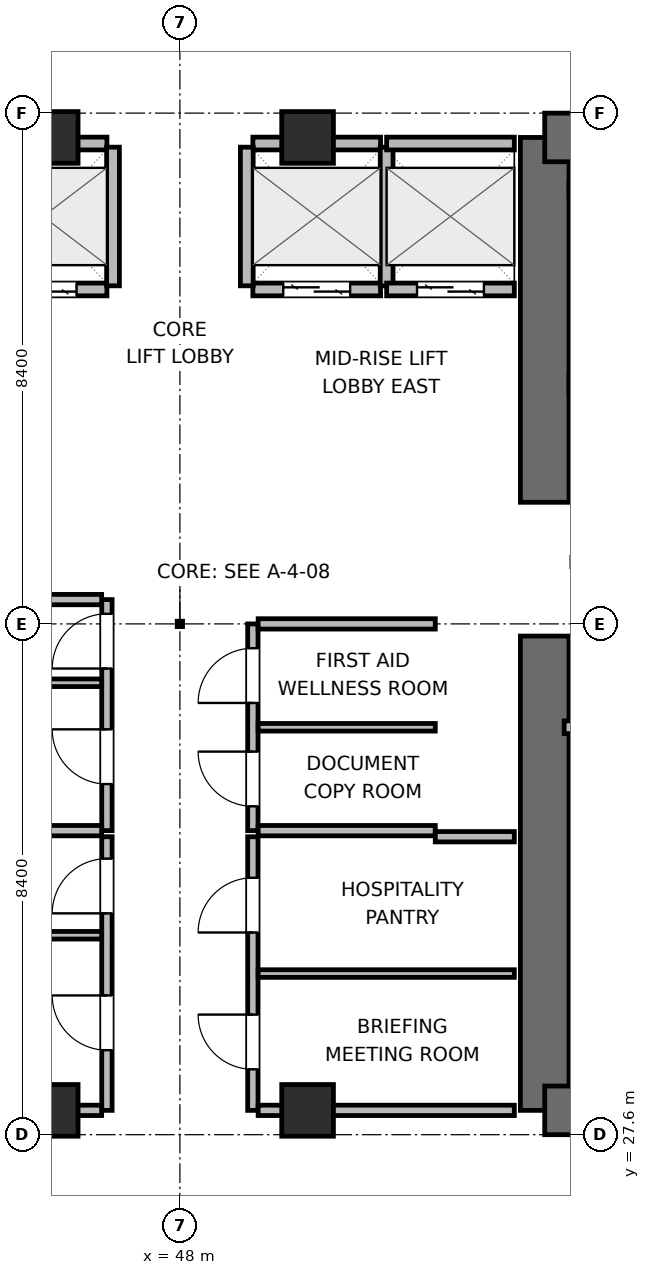
"""IFC4 building model, lengths in metres.
Left out: names, types, materials, properties, quantities, classifications, styles, units other than length and angle.
Written with IfcOpenShell. Run it as: python <this file> out.ifc"""

import sys

from ifc_helpers import new_model, si_unit, direction, frame, frame_2d, origin, origin_2d, place, context, subcontext, project, spatial, rectangle, extrude, element, fill, save


model = new_model("IFC4")
c1 = context("Model", 3, precision=1e-05, world=origin(), true_north=direction((0.0, 1.0)))
c2 = subcontext(c1, "Body", "Model", "MODEL_VIEW")
j1 = project(units=[si_unit("LENGTHUNIT", "METRE"), si_unit("PLANEANGLEUNIT", "RADIAN")], contexts=[c1])
p1 = place(None, origin())
s1 = spatial("IfcSite", under=j1, at=p1, CompositionType="ELEMENT")
p2 = place(p1, origin())
s2 = spatial("IfcBuilding", under=s1, at=p2, CompositionType="ELEMENT")
p3 = place(p2, frame((0.0, 0.0, 174.0)))
s3 = spatial("IfcBuildingStorey", under=s2, at=p3, CompositionType="ELEMENT", Elevation=174.0)
p4 = place(p3, frame((54.0, 28.0, 0.0), z_axis=(0.0, 0.0, 1.0), x_axis=(0.0, 1.0, 0.0)))
e1 = element("IfcWall", 1, at=p4, inside=s3, PredefinedType="SHEAR", context=c2, shape_type="SweptSolid", body=[
    extrude(rectangle(XDim=7.8, YDim=0.8, at=frame_2d((3.9, 0.0))), origin(), (0.0, 0.0, 1.0), 3.9),
])
p5 = place(p3, frame((54.0, 38.0, 0.0), z_axis=(0.0, 0.0, 1.0), x_axis=(0.0, 1.0, 0.0)))
e2 = element("IfcWall", 2, at=p5, inside=s3, PredefinedType="SHEAR", context=c2, shape_type="SweptSolid", body=[
    extrude(rectangle(XDim=6.0, YDim=0.8, at=frame_2d((3.0, 0.0))), origin(), (0.0, 0.0, 1.0), 3.9),
])
p6 = place(p3, frame((54.0, 28.0, 0.0), z_axis=(0.0, 0.0, 1.0), x_axis=(1.0, 0.0, 0.0)))
e3 = element("IfcWall", 3, at=p6, inside=s3, PredefinedType="SHEAR", context=c2, shape_type="SweptSolid", body=[
    extrude(rectangle(XDim=9.2, YDim=0.8, at=frame_2d((4.6, 0.0))), origin(), (0.0, 0.0, 1.0), 3.9),
])
p7 = place(p6, frame((3.975, 0.0, 0.0)))
e4 = element("IfcOpeningElement", 4, at=p7, cuts=e3, PredefinedType="OPENING", context=c2, shape_type="SweptSolid", body=[
    extrude(rectangle(XDim=1.05, YDim=2.04, at=frame_2d((0.525, 1.02))), frame((0.0, 0.41, 0.0), z_axis=(0.0, -1.0, 0.0), x_axis=(1.0, 0.0, 0.0)), (0.0, 0.0, 1.0), 0.82),
])
p8 = place(p3, frame((54.0, 44.0, 0.0), z_axis=(0.0, 0.0, 1.0), x_axis=(1.0, 0.0, 0.0)))
e5 = element("IfcWall", 5, at=p8, inside=s3, PredefinedType="SHEAR", context=c2, shape_type="SweptSolid", body=[
    extrude(rectangle(XDim=9.2, YDim=0.8, at=frame_2d((4.6, 0.0))), origin(), (0.0, 0.0, 1.0), 3.9),
])
p9 = place(p3, frame((54.4, 39.95, 0.0), z_axis=(0.0, 0.0, 1.0), x_axis=(1.0, 0.0, 0.0)))
e6 = element("IfcWall", 6, at=p9, inside=s3, PredefinedType="SHEAR", context=c2, shape_type="SweptSolid", body=[
    extrude(rectangle(XDim=8.4, YDim=0.26, at=frame_2d((4.2, 0.0))), origin(), (0.0, 0.0, 1.0), 3.9),
])
p10 = place(p9, frame((0.8, 0.0, 0.0)))
e7 = element("IfcOpeningElement", 7, at=p10, cuts=e6, PredefinedType="OPENING", context=c2, shape_type="SweptSolid", body=[
    extrude(rectangle(XDim=1.0, YDim=2.04, at=frame_2d((0.5, 1.02))), frame((0.0, 0.14, 0.0), z_axis=(0.0, -1.0, 0.0), x_axis=(1.0, 0.0, 0.0)), (0.0, 0.0, 1.0), 0.28),
])
p11 = place(p3, frame((54.4, 43.15, 0.0), z_axis=(0.0, 0.0, 1.0), x_axis=(1.0, 0.0, 0.0)))
e8 = element("IfcWall", 8, at=p11, inside=s3, PredefinedType="SHEAR", context=c2, shape_type="SweptSolid", body=[
    extrude(rectangle(XDim=8.4, YDim=0.26, at=frame_2d((4.2, 0.0))), origin(), (0.0, 0.0, 1.0), 3.9),
])
for number, where, z_axis, x_axis in (
    (9, (45.9, 28.0, 0.0), (0.0, 0.0, 1.0), (1.0, 0.0, 0.0)),
    (10, (50.1, 28.0, 0.0), (0.0, 0.0, 1.0), (1.0, 0.0, 0.0)),
    (11, (45.9, 44.0, 0.0), (0.0, 0.0, 1.0), (1.0, 0.0, 0.0)),
    (12, (50.1, 44.0, 0.0), (0.0, 0.0, 1.0), (1.0, 0.0, 0.0)),
):
    element("IfcColumn", number, at=place(p3, frame(where, z_axis=z_axis, x_axis=x_axis)), inside=s3, PredefinedType="COLUMN", context=c2, shape_type="SweptSolid", body=[
        extrude(rectangle(XDim=0.85, YDim=0.85, at=origin_2d()), origin(), (0.0, 0.0, 1.0), 3.9),
    ])
p12 = place(p3, frame((54.32, 34.3, 0.0), z_axis=(0.0, 0.0, 1.0), x_axis=(1.0, 0.0, 0.0)))
e13 = element("IfcWall", 13, at=p12, inside=s3, PredefinedType="PARTITIONING", context=c2, shape_type="SweptSolid", body=[
    extrude(rectangle(XDim=3.48, YDim=0.21, at=frame_2d((1.74, 0.0))), origin(), (0.0, 0.0, 1.0), 3.68),
])
p13 = place(p3, frame((44.7, 41.5, 0.0), z_axis=(0.0, 0.0, 1.0), x_axis=(1.0, 0.0, 0.0)))
e14 = element("IfcWall", 14, at=p13, inside=s3, PredefinedType="PARTITIONING", context=c2, shape_type="SweptSolid", body=[
    extrude(rectangle(XDim=2.1, YDim=0.21, at=frame_2d((1.05, 0.0))), origin(), (0.0, 0.0, 1.0), 3.68),
])
p14 = place(p13, frame((0.5, 0.0, 0.0)))
e15 = element("IfcOpeningElement", 15, at=p14, cuts=e14, PredefinedType="OPENING", context=c2, shape_type="SweptSolid", body=[
    extrude(rectangle(XDim=1.1, YDim=2.04, at=frame_2d((0.55, 1.02))), frame((0.0, 0.115, 0.0), z_axis=(0.0, -1.0, 0.0), x_axis=(1.0, 0.0, 0.0)), (0.0, 0.0, 1.0), 0.23),
])
p15 = place(p3, frame((44.7, 43.9, 0.0), z_axis=(0.0, 0.0, 1.0), x_axis=(1.0, 0.0, 0.0)))
e16 = element("IfcWall", 16, at=p15, inside=s3, PredefinedType="PARTITIONING", context=c2, shape_type="SweptSolid", body=[
    extrude(rectangle(XDim=2.1, YDim=0.21, at=frame_2d((1.05, 0.0))), origin(), (0.0, 0.0, 1.0), 2.765),
])
p16 = place(p3, frame((46.9, 41.56, 0.0), z_axis=(0.0, 0.0, 1.0), x_axis=(0.0, 1.0, 0.0)))
e17 = element("IfcWall", 17, at=p16, inside=s3, PredefinedType="PARTITIONING", context=c2, shape_type="SweptSolid", body=[
    extrude(rectangle(XDim=2.28, YDim=0.21, at=frame_2d((1.14, 0.0))), origin(), (0.0, 0.0, 1.0), 3.68),
])
p17 = place(p3, frame((49.2, 41.5, 0.0), z_axis=(0.0, 0.0, 1.0), x_axis=(1.0, 0.0, 0.0)))
e18 = element("IfcWall", 18, at=p17, inside=s3, PredefinedType="PARTITIONING", context=c2, shape_type="SweptSolid", body=[
    extrude(rectangle(XDim=2.1, YDim=0.21, at=frame_2d((1.05, 0.0))), origin(), (0.0, 0.0, 1.0), 3.68),
])
p18 = place(p17, frame((0.5, 0.0, 0.0)))
e19 = element("IfcOpeningElement", 19, at=p18, cuts=e18, PredefinedType="OPENING", context=c2, shape_type="SweptSolid", body=[
    extrude(rectangle(XDim=1.1, YDim=2.04, at=frame_2d((0.55, 1.02))), frame((0.0, 0.115, 0.0), z_axis=(0.0, -1.0, 0.0), x_axis=(1.0, 0.0, 0.0)), (0.0, 0.0, 1.0), 0.23),
])
p19 = place(p3, frame((49.2, 43.9, 0.0), z_axis=(0.0, 0.0, 1.0), x_axis=(1.0, 0.0, 0.0)))
e20 = element("IfcWall", 20, at=p19, inside=s3, PredefinedType="PARTITIONING", context=c2, shape_type="SweptSolid", body=[
    extrude(rectangle(XDim=2.1, YDim=0.21, at=frame_2d((1.05, 0.0))), origin(), (0.0, 0.0, 1.0), 2.765),
])
for number, where, z_axis, x_axis in (
    (21, (49.1, 41.56, 0.0), (0.0, 0.0, 1.0), (0.0, 1.0, 0.0)),
    (22, (51.4, 41.56, 0.0), (0.0, 0.0, 1.0), (0.0, 1.0, 0.0)),
):
    element("IfcWall", number, at=place(p3, frame(where, z_axis=z_axis, x_axis=x_axis)), inside=s3, PredefinedType="PARTITIONING", context=c2, shape_type="SweptSolid", body=[
        extrude(rectangle(XDim=2.28, YDim=0.21, at=frame_2d((1.14, 0.0))), origin(), (0.0, 0.0, 1.0), 3.68),
    ])
p20 = place(p3, frame((51.4, 41.5, 0.0), z_axis=(0.0, 0.0, 1.0), x_axis=(1.0, 0.0, 0.0)))
e23 = element("IfcWall", 23, at=p20, inside=s3, PredefinedType="PARTITIONING", context=c2, shape_type="SweptSolid", body=[
    extrude(rectangle(XDim=2.1, YDim=0.21, at=frame_2d((1.05, 0.0))), origin(), (0.0, 0.0, 1.0), 3.68),
])
p21 = place(p20, frame((0.5, 0.0, 0.0)))
e24 = element("IfcOpeningElement", 24, at=p21, cuts=e23, PredefinedType="OPENING", context=c2, shape_type="SweptSolid", body=[
    extrude(rectangle(XDim=1.1, YDim=2.04, at=frame_2d((0.55, 1.02))), frame((0.0, 0.115, 0.0), z_axis=(0.0, -1.0, 0.0), x_axis=(1.0, 0.0, 0.0)), (0.0, 0.0, 1.0), 0.23),
])
p22 = place(p3, frame((51.4, 43.9, 0.0), z_axis=(0.0, 0.0, 1.0), x_axis=(1.0, 0.0, 0.0)))
e25 = element("IfcWall", 25, at=p22, inside=s3, PredefinedType="PARTITIONING", context=c2, shape_type="SweptSolid", body=[
    extrude(rectangle(XDim=2.1, YDim=0.21, at=frame_2d((1.05, 0.0))), origin(), (0.0, 0.0, 1.0), 2.765),
])
p23 = place(p3, frame((46.8, 32.6, 0.0), z_axis=(0.0, 0.0, 1.0), x_axis=(0.0, 1.0, 0.0)))
e26 = element("IfcWall", 26, at=p23, inside=s3, PredefinedType="PARTITIONING", context=c2, shape_type="SweptSolid", body=[
    extrude(rectangle(XDim=3.8, YDim=0.17, at=frame_2d((1.9, 0.0))), origin(), (0.0, 0.0, 1.0), 3.68),
])
p24 = place(p23, frame((0.766, 0.0, 0.0)))
e27 = element("IfcOpeningElement", 27, at=p24, cuts=e26, PredefinedType="OPENING", context=c2, shape_type="SweptSolid", body=[
    extrude(rectangle(XDim=0.9, YDim=2.02, at=frame_2d((0.45, 1.01))), frame((0.0, 0.095, 0.0), z_axis=(0.0, -1.0, 0.0), x_axis=(1.0, 0.0, 0.0)), (0.0, 0.0, 1.0), 0.19),
])
p25 = place(p23, frame((2.666, 0.0, 0.0)))
e28 = element("IfcOpeningElement", 28, at=p25, cuts=e26, PredefinedType="OPENING", context=c2, shape_type="SweptSolid", body=[
    extrude(rectangle(XDim=0.9, YDim=2.02, at=frame_2d((0.45, 1.01))), frame((0.0, 0.095, 0.0), z_axis=(0.0, -1.0, 0.0), x_axis=(1.0, 0.0, 0.0)), (0.0, 0.0, 1.0), 0.19),
])
for number, where, z_axis, x_axis in (
    (29, (43.8, 32.6, 0.0), (0.0, 0.0, 1.0), (1.0, 0.0, 0.0)),
    (30, (43.8, 36.4, 0.0), (0.0, 0.0, 1.0), (1.0, 0.0, 0.0)),
):
    element("IfcWall", number, at=place(p3, frame(where, z_axis=z_axis, x_axis=x_axis)), inside=s3, PredefinedType="PARTITIONING", context=c2, shape_type="SweptSolid", body=[
        extrude(rectangle(XDim=2.913, YDim=0.17, at=frame_2d((1.457, 0.0))), origin(), (0.0, 0.0, 1.0), 3.68),
    ])
p26 = place(p3, frame((43.8, 35.032, 0.0), z_axis=(0.0, 0.0, 1.0), x_axis=(1.0, 0.0, 0.0)))
e31 = element("IfcWall", 31, at=p26, inside=s3, PredefinedType="PARTITIONING", context=c2, shape_type="SweptSolid", body=[
    extrude(rectangle(XDim=2.913, YDim=0.125, at=frame_2d((1.457, 0.0))), origin(), (0.0, 0.0, 1.0), 3.68),
])
p27 = place(p3, frame((49.2, 32.6, 0.0), z_axis=(0.0, 0.0, 1.0), x_axis=(0.0, 1.0, 0.0)))
e32 = element("IfcWall", 32, at=p27, inside=s3, PredefinedType="PARTITIONING", context=c2, shape_type="SweptSolid", body=[
    extrude(rectangle(XDim=3.4, YDim=0.17, at=frame_2d((1.7, 0.0))), origin(), (0.0, 0.0, 1.0), 3.68),
])
p28 = place(p27, frame((0.4, 0.0, 0.0)))
e33 = element("IfcOpeningElement", 33, at=p28, cuts=e32, PredefinedType="OPENING", context=c2, shape_type="SweptSolid", body=[
    extrude(rectangle(XDim=0.9, YDim=2.02, at=frame_2d((0.45, 1.01))), frame((0.0, 0.095, 0.0), z_axis=(0.0, -1.0, 0.0), x_axis=(1.0, 0.0, 0.0)), (0.0, 0.0, 1.0), 0.19),
])
p29 = place(p27, frame((2.1, 0.0, 0.0)))
e34 = element("IfcOpeningElement", 34, at=p29, cuts=e32, PredefinedType="OPENING", context=c2, shape_type="SweptSolid", body=[
    extrude(rectangle(XDim=0.9, YDim=2.02, at=frame_2d((0.45, 1.01))), frame((0.0, 0.095, 0.0), z_axis=(0.0, -1.0, 0.0), x_axis=(1.0, 0.0, 0.0)), (0.0, 0.0, 1.0), 0.19),
])
for number, where, z_axis, x_axis in (
    (35, (49.287, 32.6, 0.0), (0.0, 0.0, 1.0), (1.0, 0.0, 0.0)),
    (36, (49.287, 36.0, 0.0), (0.0, 0.0, 1.0), (1.0, 0.0, 0.0)),
):
    element("IfcWall", number, at=place(p3, frame(where, z_axis=z_axis, x_axis=x_axis)), inside=s3, PredefinedType="PARTITIONING", context=c2, shape_type="SweptSolid", body=[
        extrude(rectangle(XDim=2.913, YDim=0.17, at=frame_2d((1.457, 0.0))), origin(), (0.0, 0.0, 1.0), 3.68),
    ])
p30 = place(p3, frame((49.287, 34.3, 0.0), z_axis=(0.0, 0.0, 1.0), x_axis=(1.0, 0.0, 0.0)))
e37 = element("IfcWall", 37, at=p30, inside=s3, PredefinedType="PARTITIONING", context=c2, shape_type="SweptSolid", body=[
    extrude(rectangle(XDim=2.913, YDim=0.125, at=frame_2d((1.457, 0.0))), origin(), (0.0, 0.0, 1.0), 3.68),
])
p31 = place(p3, frame((46.8, 28.0, 0.0), z_axis=(0.0, 0.0, 1.0), x_axis=(0.0, 1.0, 0.0)))
e38 = element("IfcWall", 38, at=p31, inside=s3, PredefinedType="PARTITIONING", context=c2, shape_type="SweptSolid", body=[
    extrude(rectangle(XDim=4.5, YDim=0.17, at=frame_2d((2.25, 0.0))), origin(), (0.0, 0.0, 1.0), 3.68),
])
p32 = place(p31, frame((0.99, 0.0, 0.0)))
e39 = element("IfcOpeningElement", 39, at=p32, cuts=e38, PredefinedType="OPENING", context=c2, shape_type="SweptSolid", body=[
    extrude(rectangle(XDim=0.9, YDim=2.02, at=frame_2d((0.45, 1.01))), frame((0.0, 0.095, 0.0), z_axis=(0.0, -1.0, 0.0), x_axis=(1.0, 0.0, 0.0)), (0.0, 0.0, 1.0), 0.19),
])
p33 = place(p31, frame((3.24, 0.0, 0.0)))
e40 = element("IfcOpeningElement", 40, at=p33, cuts=e38, PredefinedType="OPENING", context=c2, shape_type="SweptSolid", body=[
    extrude(rectangle(XDim=0.9, YDim=2.02, at=frame_2d((0.45, 1.01))), frame((0.0, 0.095, 0.0), z_axis=(0.0, -1.0, 0.0), x_axis=(1.0, 0.0, 0.0)), (0.0, 0.0, 1.0), 0.19),
])
p34 = place(p3, frame((42.5, 28.0, 0.0), z_axis=(0.0, 0.0, 1.0), x_axis=(1.0, 0.0, 0.0)))
e41 = element("IfcWall", 41, at=p34, inside=s3, PredefinedType="PARTITIONING", context=c2, shape_type="SweptSolid", body=[
    extrude(rectangle(XDim=4.213, YDim=0.17, at=frame_2d((2.106, 0.0))), origin(), (0.0, 0.0, 1.0), 2.765),
])
p35 = place(p3, frame((42.5, 30.88, 0.0), z_axis=(0.0, 0.0, 1.0), x_axis=(1.0, 0.0, 0.0)))
e42 = element("IfcWall", 42, at=p35, inside=s3, PredefinedType="PARTITIONING", context=c2, shape_type="SweptSolid", body=[
    extrude(rectangle(XDim=4.213, YDim=0.125, at=frame_2d((2.106, 0.0))), origin(), (0.0, 0.0, 1.0), 3.68),
])
p36 = place(p3, frame((49.2, 28.0, 0.0), z_axis=(0.0, 0.0, 1.0), x_axis=(0.0, 1.0, 0.0)))
e43 = element("IfcWall", 43, at=p36, inside=s3, PredefinedType="PARTITIONING", context=c2, shape_type="SweptSolid", body=[
    extrude(rectangle(XDim=4.5, YDim=0.17, at=frame_2d((2.25, 0.0))), origin(), (0.0, 0.0, 1.0), 3.68),
])
p37 = place(p36, frame((0.675, 0.0, 0.0)))
e44 = element("IfcOpeningElement", 44, at=p37, cuts=e43, PredefinedType="OPENING", context=c2, shape_type="SweptSolid", body=[
    extrude(rectangle(XDim=0.9, YDim=2.02, at=frame_2d((0.45, 1.01))), frame((0.0, 0.095, 0.0), z_axis=(0.0, -1.0, 0.0), x_axis=(1.0, 0.0, 0.0)), (0.0, 0.0, 1.0), 0.19),
])
p38 = place(p36, frame((2.925, 0.0, 0.0)))
e45 = element("IfcOpeningElement", 45, at=p38, cuts=e43, PredefinedType="OPENING", context=c2, shape_type="SweptSolid", body=[
    extrude(rectangle(XDim=0.9, YDim=2.02, at=frame_2d((0.45, 1.01))), frame((0.0, 0.095, 0.0), z_axis=(0.0, -1.0, 0.0), x_axis=(1.0, 0.0, 0.0)), (0.0, 0.0, 1.0), 0.19),
])
p39 = place(p3, frame((49.287, 28.0, 0.0), z_axis=(0.0, 0.0, 1.0), x_axis=(1.0, 0.0, 0.0)))
e46 = element("IfcWall", 46, at=p39, inside=s3, PredefinedType="PARTITIONING", context=c2, shape_type="SweptSolid", body=[
    extrude(rectangle(XDim=4.213, YDim=0.17, at=frame_2d((2.106, 0.0))), origin(), (0.0, 0.0, 1.0), 2.765),
])
p40 = place(p3, frame((52.2, 32.5, 0.0), z_axis=(0.0, 0.0, 1.0), x_axis=(1.0, 0.0, 0.0)))
e47 = element("IfcWall", 47, at=p40, inside=s3, PredefinedType="PARTITIONING", context=c2, shape_type="SweptSolid", body=[
    extrude(rectangle(XDim=1.3, YDim=0.17, at=frame_2d((0.65, 0.0))), origin(), (0.0, 0.0, 1.0), 3.68),
])
p41 = place(p3, frame((49.287, 30.25, 0.0), z_axis=(0.0, 0.0, 1.0), x_axis=(1.0, 0.0, 0.0)))
e48 = element("IfcWall", 48, at=p41, inside=s3, PredefinedType="PARTITIONING", context=c2, shape_type="SweptSolid", body=[
    extrude(rectangle(XDim=4.213, YDim=0.125, at=frame_2d((2.106, 0.0))), origin(), (0.0, 0.0, 1.0), 3.68),
])
p42 = place(p14, origin())
e49 = element("IfcDoor", 49, at=p42, inside=s3, OperationType="DOUBLE_DOOR_SLIDING", PredefinedType="DOOR", context=c2, shape_type="SweptSolid", body=[
    extrude(rectangle(XDim=1.1, YDim=2.04, at=frame_2d((0.55, 1.02))), frame((0.0, 0.025, 0.0), z_axis=(0.0, -1.0, 0.0), x_axis=(1.0, 0.0, 0.0)), (0.0, 0.0, 1.0), 0.05),
])
fill(e15, e49)
p43 = place(p18, origin())
e50 = element("IfcDoor", 50, at=p43, inside=s3, OperationType="DOUBLE_DOOR_SLIDING", PredefinedType="DOOR", context=c2, shape_type="SweptSolid", body=[
    extrude(rectangle(XDim=1.1, YDim=2.04, at=frame_2d((0.55, 1.02))), frame((0.0, 0.025, 0.0), z_axis=(0.0, -1.0, 0.0), x_axis=(1.0, 0.0, 0.0)), (0.0, 0.0, 1.0), 0.05),
])
fill(e19, e50)
p44 = place(p21, origin())
e51 = element("IfcDoor", 51, at=p44, inside=s3, OperationType="DOUBLE_DOOR_SLIDING", PredefinedType="DOOR", context=c2, shape_type="SweptSolid", body=[
    extrude(rectangle(XDim=1.1, YDim=2.04, at=frame_2d((0.55, 1.02))), frame((0.0, 0.025, 0.0), z_axis=(0.0, -1.0, 0.0), x_axis=(1.0, 0.0, 0.0)), (0.0, 0.0, 1.0), 0.05),
])
fill(e24, e51)
p45 = place(p24, origin())
e52 = element("IfcDoor", 52, at=p45, inside=s3, OperationType="SINGLE_SWING_RIGHT", PredefinedType="DOOR", context=c2, shape_type="SweptSolid", body=[
    extrude(rectangle(XDim=0.9, YDim=2.02, at=frame_2d((0.45, 1.01))), frame((0.0, 0.025, 0.0), z_axis=(0.0, -1.0, 0.0), x_axis=(1.0, 0.0, 0.0)), (0.0, 0.0, 1.0), 0.05),
])
fill(e27, e52)
p46 = place(p25, origin())
e53 = element("IfcDoor", 53, at=p46, inside=s3, OperationType="SINGLE_SWING_LEFT", PredefinedType="DOOR", context=c2, shape_type="SweptSolid", body=[
    extrude(rectangle(XDim=0.9, YDim=2.02, at=frame_2d((0.45, 1.01))), frame((0.0, 0.025, 0.0), z_axis=(0.0, -1.0, 0.0), x_axis=(1.0, 0.0, 0.0)), (0.0, 0.0, 1.0), 0.05),
])
fill(e28, e53)
p47 = place(p28, origin())
e54 = element("IfcDoor", 54, at=p47, inside=s3, OperationType="SINGLE_SWING_RIGHT", PredefinedType="DOOR", context=c2, shape_type="SweptSolid", body=[
    extrude(rectangle(XDim=0.9, YDim=2.02, at=frame_2d((0.45, 1.01))), frame((0.0, 0.025, 0.0), z_axis=(0.0, -1.0, 0.0), x_axis=(1.0, 0.0, 0.0)), (0.0, 0.0, 1.0), 0.05),
])
fill(e33, e54)
p48 = place(p29, origin())
e55 = element("IfcDoor", 55, at=p48, inside=s3, OperationType="SINGLE_SWING_LEFT", PredefinedType="DOOR", context=c2, shape_type="SweptSolid", body=[
    extrude(rectangle(XDim=0.9, YDim=2.02, at=frame_2d((0.45, 1.01))), frame((0.0, 0.025, 0.0), z_axis=(0.0, -1.0, 0.0), x_axis=(1.0, 0.0, 0.0)), (0.0, 0.0, 1.0), 0.05),
])
fill(e34, e55)
p49 = place(p32, origin())
e56 = element("IfcDoor", 56, at=p49, inside=s3, OperationType="SINGLE_SWING_RIGHT", PredefinedType="DOOR", context=c2, shape_type="SweptSolid", body=[
    extrude(rectangle(XDim=0.9, YDim=2.02, at=frame_2d((0.45, 1.01))), frame((0.0, 0.025, 0.0), z_axis=(0.0, -1.0, 0.0), x_axis=(1.0, 0.0, 0.0)), (0.0, 0.0, 1.0), 0.05),
])
fill(e39, e56)
p50 = place(p33, origin())
e57 = element("IfcDoor", 57, at=p50, inside=s3, OperationType="SINGLE_SWING_LEFT", PredefinedType="DOOR", context=c2, shape_type="SweptSolid", body=[
    extrude(rectangle(XDim=0.9, YDim=2.02, at=frame_2d((0.45, 1.01))), frame((0.0, 0.025, 0.0), z_axis=(0.0, -1.0, 0.0), x_axis=(1.0, 0.0, 0.0)), (0.0, 0.0, 1.0), 0.05),
])
fill(e40, e57)
p51 = place(p37, origin())
e58 = element("IfcDoor", 58, at=p51, inside=s3, OperationType="SINGLE_SWING_RIGHT", PredefinedType="DOOR", context=c2, shape_type="SweptSolid", body=[
    extrude(rectangle(XDim=0.9, YDim=2.02, at=frame_2d((0.45, 1.01))), frame((0.0, 0.025, 0.0), z_axis=(0.0, -1.0, 0.0), x_axis=(1.0, 0.0, 0.0)), (0.0, 0.0, 1.0), 0.05),
])
fill(e44, e58)
p52 = place(p38, origin())
e59 = element("IfcDoor", 59, at=p52, inside=s3, OperationType="SINGLE_SWING_LEFT", PredefinedType="DOOR", context=c2, shape_type="SweptSolid", body=[
    extrude(rectangle(XDim=0.9, YDim=2.02, at=frame_2d((0.45, 1.01))), frame((0.0, 0.025, 0.0), z_axis=(0.0, -1.0, 0.0), x_axis=(1.0, 0.0, 0.0)), (0.0, 0.0, 1.0), 0.05),
])
fill(e45, e59)
save(model, sys.argv[1])
